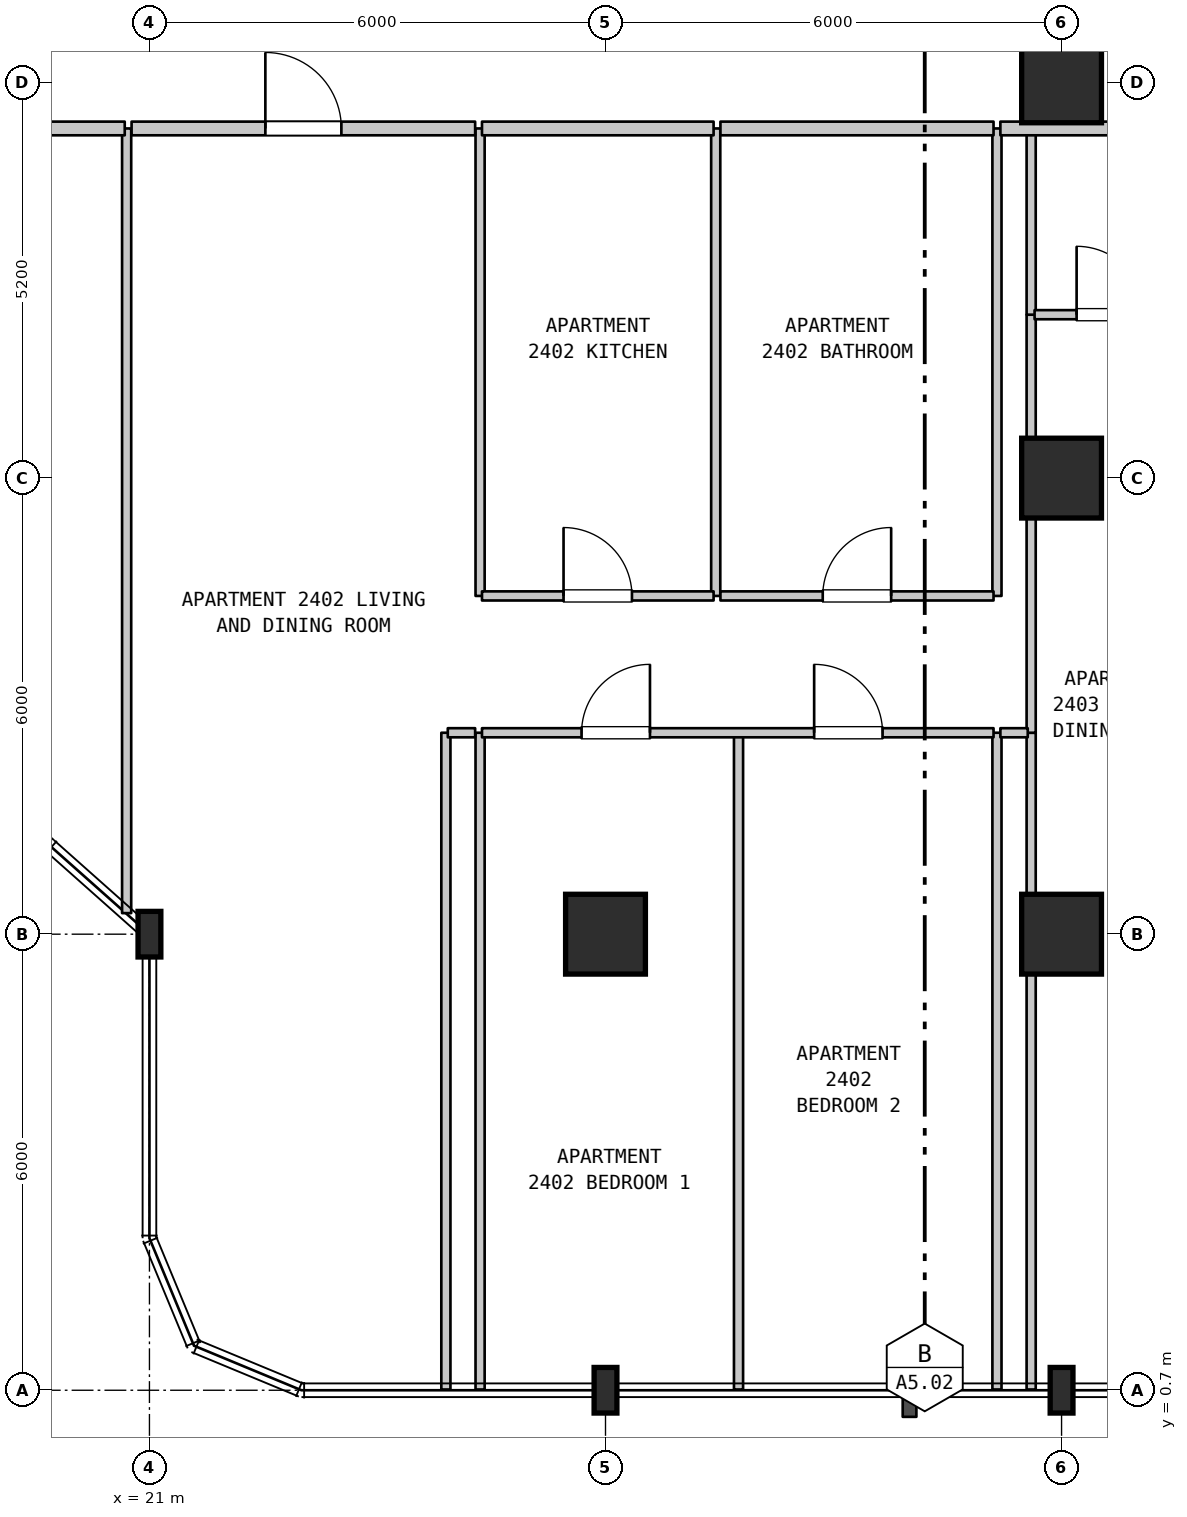
"""IFC4 building model, lengths in metres.
Left out: names, types, materials, properties, quantities, classifications, styles, units other than length and angle.
Written with IfcOpenShell. Run it as: python <this file> out.ifc"""

import sys

from ifc_helpers import new_model, si_unit, direction, frame, frame_2d, origin, origin_2d, place, context, subcontext, project, spatial, rectangle, i_section, extrude, element, fill, save


model = new_model("IFC4")
c1 = context("Model", 3, precision=1e-05, world=origin(), true_north=direction((0.0, 1.0)))
c2 = subcontext(c1, "Body", "Model", "MODEL_VIEW")
j1 = project(units=[si_unit("LENGTHUNIT", "METRE"), si_unit("PLANEANGLEUNIT", "RADIAN")], contexts=[c1])
p1 = place(None, origin())
s1 = spatial("IfcSite", under=j1, at=p1, CompositionType="ELEMENT")
p2 = place(p1, origin())
s2 = spatial("IfcBuilding", under=s1, at=p2, CompositionType="ELEMENT")
p3 = place(p2, frame((0.0, 0.0, 102.0)))
s3 = spatial("IfcBuildingStorey", under=s2, at=p3, CompositionType="ELEMENT", Elevation=102.0)
for number, where, z_axis, x_axis in (
    (1, (21.0, 6.7, 0.0), (0.0, 0.0, 1.0), (1.0, 0.0, 0.0)),
    (2, (27.0, 0.7, 0.0), (0.0, 0.0, 1.0), (1.0, 0.0, 0.0)),
):
    element("IfcColumn", number, at=place(p3, frame(where, z_axis=z_axis, x_axis=x_axis)), inside=s3, PredefinedType="COLUMN", context=c2, shape_type="SweptSolid", body=[
        extrude(i_section(OverallWidth=0.3, OverallDepth=0.6, WebThickness=0.015, FlangeThickness=0.03, FilletRadius=0.027, at=origin_2d()), origin(), (0.0, 0.0, 1.0), 3.7),
    ])
p4 = place(p3, frame((27.0, 6.7, 0.0), z_axis=(0.0, 0.0, 1.0), x_axis=(1.0, 0.0, 0.0)))
e3 = element("IfcColumn", 3, at=p4, inside=s3, PredefinedType="COLUMN", context=c2, shape_type="SweptSolid", body=[
    extrude(rectangle(XDim=1.05, YDim=1.05, at=origin_2d()), origin(), (0.0, 0.0, 1.0), 3.7),
])
p5 = place(p3, frame((33.0, 0.7, 0.0), z_axis=(0.0, 0.0, 1.0), x_axis=(1.0, 0.0, 0.0)))
e4 = element("IfcColumn", 4, at=p5, inside=s3, PredefinedType="COLUMN", context=c2, shape_type="SweptSolid", body=[
    extrude(i_section(OverallWidth=0.3, OverallDepth=0.6, WebThickness=0.015, FlangeThickness=0.03, FilletRadius=0.027, at=origin_2d()), origin(), (0.0, 0.0, 1.0), 3.7),
])
for number, where, z_axis, x_axis in (
    (5, (33.0, 6.7, 0.0), (0.0, 0.0, 1.0), (1.0, 0.0, 0.0)),
    (6, (33.0, 12.7, 0.0), (0.0, 0.0, 1.0), (1.0, 0.0, 0.0)),
    (7, (33.0, 17.9, 0.0), (0.0, 0.0, 1.0), (1.0, 0.0, 0.0)),
):
    element("IfcColumn", number, at=place(p3, frame(where, z_axis=z_axis, x_axis=x_axis)), inside=s3, PredefinedType="COLUMN", context=c2, shape_type="SweptSolid", body=[
        extrude(rectangle(XDim=1.05, YDim=1.05, at=origin_2d()), origin(), (0.0, 0.0, 1.0), 3.7),
    ])
p6 = place(p3, frame((20.7, 6.977, 0.0), z_axis=(0.0, 0.0, 1.0), x_axis=(0.0, 1.0, 0.0)))
e8 = element("IfcWall", 8, at=p6, inside=s3, PredefinedType="PARTITIONING", context=c2, shape_type="SweptSolid", body=[
    extrude(rectangle(XDim=10.323, YDim=0.12, at=frame_2d((5.162, 0.0))), origin(), (0.0, 0.0, 1.0), 3.385),
])
for number, where, z_axis, x_axis in (
    (9, (24.9, 0.71, 0.0), (0.0, 0.0, 1.0), (0.0, 1.0, 0.0)),
    (10, (25.35, 0.71, 0.0), (0.0, 0.0, 1.0), (0.0, 1.0, 0.0)),
):
    element("IfcWall", number, at=place(p3, frame(where, z_axis=z_axis, x_axis=x_axis)), inside=s3, PredefinedType="PARTITIONING", context=c2, shape_type="SweptSolid", body=[
        extrude(rectangle(XDim=8.64, YDim=0.12, at=frame_2d((4.32, 0.0))), origin(), (0.0, 0.0, 1.0), 3.385),
    ])
for number, where, z_axis, x_axis in (
    (11, (25.35, 11.15, 0.0), (0.0, 0.0, 1.0), (0.0, 1.0, 0.0)),
    (12, (28.45, 11.15, 0.0), (0.0, 0.0, 1.0), (0.0, 1.0, 0.0)),
):
    element("IfcWall", number, at=place(p3, frame(where, z_axis=z_axis, x_axis=x_axis)), inside=s3, PredefinedType="PARTITIONING", context=c2, shape_type="SweptSolid", body=[
        extrude(rectangle(XDim=6.15, YDim=0.12, at=frame_2d((3.075, 0.0))), origin(), (0.0, 0.0, 1.0), 3.385),
    ])
for number, where, z_axis, x_axis in (
    (13, (28.75, 0.71, 0.0), (0.0, 0.0, 1.0), (0.0, 1.0, 0.0)),
    (14, (32.15, 0.71, 0.0), (0.0, 0.0, 1.0), (0.0, 1.0, 0.0)),
):
    element("IfcWall", number, at=place(p3, frame(where, z_axis=z_axis, x_axis=x_axis)), inside=s3, PredefinedType="PARTITIONING", context=c2, shape_type="SweptSolid", body=[
        extrude(rectangle(XDim=8.64, YDim=0.12, at=frame_2d((4.32, 0.0))), origin(), (0.0, 0.0, 1.0), 3.385),
    ])
p7 = place(p3, frame((32.15, 11.15, 0.0), z_axis=(0.0, 0.0, 1.0), x_axis=(0.0, 1.0, 0.0)))
e15 = element("IfcWall", 15, at=p7, inside=s3, PredefinedType="PARTITIONING", context=c2, shape_type="SweptSolid", body=[
    extrude(rectangle(XDim=6.15, YDim=0.12, at=frame_2d((3.075, 0.0))), origin(), (0.0, 0.0, 1.0), 3.385),
])
p8 = place(p3, frame((32.6, 0.71, 0.0), z_axis=(0.0, 0.0, 1.0), x_axis=(0.0, 1.0, 0.0)))
e16 = element("IfcWall", 16, at=p8, inside=s3, PredefinedType="PARTITIONING", context=c2, shape_type="SweptSolid", body=[
    extrude(rectangle(XDim=8.64, YDim=0.12, at=frame_2d((4.32, 0.0))), origin(), (0.0, 0.0, 1.0), 3.385),
])
p9 = place(p3, frame((32.6, 9.35, 0.0), z_axis=(0.0, 0.0, 1.0), x_axis=(0.0, 1.0, 0.0)))
e17 = element("IfcWall", 17, at=p9, inside=s3, PredefinedType="PARTITIONING", context=c2, shape_type="SweptSolid", body=[
    extrude(rectangle(XDim=5.5, YDim=0.12, at=frame_2d((2.75, 0.0))), origin(), (0.0, 0.0, 1.0), 3.385),
])
p10 = place(p3, frame((32.6, 14.85, 0.0), z_axis=(0.0, 0.0, 1.0), x_axis=(0.0, 1.0, 0.0)))
e18 = element("IfcWall", 18, at=p10, inside=s3, PredefinedType="PARTITIONING", context=c2, shape_type="SweptSolid", body=[
    extrude(rectangle(XDim=2.45, YDim=0.12, at=frame_2d((1.225, 0.0))), origin(), (0.0, 0.0, 1.0), 3.385),
])
p11 = place(p3, frame((24.925, 9.35, 0.0), z_axis=(0.0, 0.0, 1.0), x_axis=(1.0, 0.0, 0.0)))
e19 = element("IfcWall", 19, at=p11, inside=s3, PredefinedType="PARTITIONING", context=c2, shape_type="SweptSolid", body=[
    extrude(rectangle(XDim=0.36, YDim=0.12, at=frame_2d((0.18, 0.0))), origin(), (0.0, 0.0, 1.0), 3.385),
])
p12 = place(p3, frame((25.375, 9.35, 0.0), z_axis=(0.0, 0.0, 1.0), x_axis=(1.0, 0.0, 0.0)))
e20 = element("IfcWall", 20, at=p12, inside=s3, PredefinedType="PARTITIONING", context=c2, shape_type="SweptSolid", body=[
    extrude(rectangle(XDim=6.73, YDim=0.12, at=frame_2d((3.365, 0.0))), origin(), (0.0, 0.0, 1.0), 3.385),
])
p13 = place(p12, frame((1.31, 0.0, 0.0)))
e21 = element("IfcOpeningElement", 21, at=p13, cuts=e20, PredefinedType="OPENING", context=c2, shape_type="SweptSolid", body=[
    extrude(rectangle(XDim=0.9, YDim=2.15, at=frame_2d((0.45, 1.075))), frame((0.0, 0.07, 0.0), z_axis=(0.0, -1.0, 0.0), x_axis=(1.0, 0.0, 0.0)), (0.0, 0.0, 1.0), 0.14),
])
p14 = place(p12, frame((4.37, 0.0, 0.0)))
e22 = element("IfcOpeningElement", 22, at=p14, cuts=e20, PredefinedType="OPENING", context=c2, shape_type="SweptSolid", body=[
    extrude(rectangle(XDim=0.9, YDim=2.15, at=frame_2d((0.45, 1.075))), frame((0.0, 0.07, 0.0), z_axis=(0.0, -1.0, 0.0), x_axis=(1.0, 0.0, 0.0)), (0.0, 0.0, 1.0), 0.14),
])
p15 = place(p3, frame((32.195, 9.35, 0.0), z_axis=(0.0, 0.0, 1.0), x_axis=(1.0, 0.0, 0.0)))
e23 = element("IfcWall", 23, at=p15, inside=s3, PredefinedType="PARTITIONING", context=c2, shape_type="SweptSolid", body=[
    extrude(rectangle(XDim=0.36, YDim=0.12, at=frame_2d((0.18, 0.0))), origin(), (0.0, 0.0, 1.0), 3.385),
])
p16 = place(p3, frame((25.375, 11.15, 0.0), z_axis=(0.0, 0.0, 1.0), x_axis=(1.0, 0.0, 0.0)))
e24 = element("IfcWall", 24, at=p16, inside=s3, PredefinedType="PARTITIONING", context=c2, shape_type="SweptSolid", body=[
    extrude(rectangle(XDim=3.047, YDim=0.12, at=frame_2d((1.523, 0.0))), origin(), (0.0, 0.0, 1.0), 3.385),
])
p17 = place(p16, frame((1.073, 0.0, 0.0)))
e25 = element("IfcOpeningElement", 25, at=p17, cuts=e24, PredefinedType="OPENING", context=c2, shape_type="SweptSolid", body=[
    extrude(rectangle(XDim=0.9, YDim=2.15, at=frame_2d((0.45, 1.075))), frame((0.0, 0.07, 0.0), z_axis=(0.0, -1.0, 0.0), x_axis=(1.0, 0.0, 0.0)), (0.0, 0.0, 1.0), 0.14),
])
p18 = place(p3, frame((28.512, 11.15, 0.0), z_axis=(0.0, 0.0, 1.0), x_axis=(1.0, 0.0, 0.0)))
e26 = element("IfcWall", 26, at=p18, inside=s3, PredefinedType="PARTITIONING", context=c2, shape_type="SweptSolid", body=[
    extrude(rectangle(XDim=3.593, YDim=0.12, at=frame_2d((1.796, 0.0))), origin(), (0.0, 0.0, 1.0), 3.385),
])
p19 = place(p18, frame((1.346, 0.0, 0.0)))
e27 = element("IfcOpeningElement", 27, at=p19, cuts=e26, PredefinedType="OPENING", context=c2, shape_type="SweptSolid", body=[
    extrude(rectangle(XDim=0.9, YDim=2.1, at=frame_2d((0.45, 1.05))), frame((0.0, 0.07, 0.0), z_axis=(0.0, -1.0, 0.0), x_axis=(1.0, 0.0, 0.0)), (0.0, 0.0, 1.0), 0.14),
])
p20 = place(p3, frame((32.645, 14.85, 0.0), z_axis=(0.0, 0.0, 1.0), x_axis=(1.0, 0.0, 0.0)))
e28 = element("IfcWall", 28, at=p20, inside=s3, PredefinedType="PARTITIONING", context=c2, shape_type="SweptSolid", body=[
    extrude(rectangle(XDim=2.16, YDim=0.12, at=frame_2d((1.08, 0.0))), origin(), (0.0, 0.0, 1.0), 3.385),
])
p21 = place(p20, frame((0.553, 0.0, 0.0)))
e29 = element("IfcOpeningElement", 29, at=p21, cuts=e28, PredefinedType="OPENING", context=c2, shape_type="SweptSolid", body=[
    extrude(rectangle(XDim=0.9, YDim=2.15, at=frame_2d((0.45, 1.075))), frame((0.0, 0.07, 0.0), z_axis=(0.0, -1.0, 0.0), x_axis=(1.0, 0.0, 0.0)), (0.0, 0.0, 1.0), 0.14),
])
p22 = place(p3, frame((18.815, 17.3, 0.0), z_axis=(0.0, 0.0, 1.0), x_axis=(1.0, 0.0, 0.0)))
e30 = element("IfcWall", 30, at=p22, inside=s3, PredefinedType="STANDARD", context=c2, shape_type="SweptSolid", body=[
    extrude(rectangle(XDim=1.86, YDim=0.18, at=frame_2d((0.93, 0.0))), origin(), (0.0, 0.0, 1.0), 3.385),
])
p23 = place(p3, frame((20.765, 17.3, 0.0), z_axis=(0.0, 0.0, 1.0), x_axis=(1.0, 0.0, 0.0)))
e31 = element("IfcWall", 31, at=p23, inside=s3, PredefinedType="STANDARD", context=c2, shape_type="SweptSolid", body=[
    extrude(rectangle(XDim=4.52, YDim=0.18, at=frame_2d((2.26, 0.0))), origin(), (0.0, 0.0, 1.0), 3.385),
])
p24 = place(p23, frame((1.76, 0.0, 0.0)))
e32 = element("IfcOpeningElement", 32, at=p24, cuts=e31, PredefinedType="OPENING", context=c2, shape_type="SweptSolid", body=[
    extrude(rectangle(XDim=1.0, YDim=2.15, at=frame_2d((0.5, 1.075))), frame((0.0, 0.1, 0.0), z_axis=(0.0, -1.0, 0.0), x_axis=(1.0, 0.0, 0.0)), (0.0, 0.0, 1.0), 0.2),
])
p25 = place(p3, frame((25.375, 17.3, 0.0), z_axis=(0.0, 0.0, 1.0), x_axis=(1.0, 0.0, 0.0)))
e33 = element("IfcWall", 33, at=p25, inside=s3, PredefinedType="STANDARD", context=c2, shape_type="SweptSolid", body=[
    extrude(rectangle(XDim=3.047, YDim=0.18, at=frame_2d((1.523, 0.0))), origin(), (0.0, 0.0, 1.0), 3.385),
])
p26 = place(p3, frame((28.512, 17.3, 0.0), z_axis=(0.0, 0.0, 1.0), x_axis=(1.0, 0.0, 0.0)))
e34 = element("IfcWall", 34, at=p26, inside=s3, PredefinedType="STANDARD", context=c2, shape_type="SweptSolid", body=[
    extrude(rectangle(XDim=3.593, YDim=0.18, at=frame_2d((1.796, 0.0))), origin(), (0.0, 0.0, 1.0), 3.385),
])
p27 = place(p3, frame((32.195, 17.3, 0.0), z_axis=(0.0, 0.0, 1.0), x_axis=(1.0, 0.0, 0.0)))
e35 = element("IfcWall", 35, at=p27, inside=s3, PredefinedType="STANDARD", context=c2, shape_type="SweptSolid", body=[
    extrude(rectangle(XDim=5.14, YDim=0.18, at=frame_2d((2.57, 0.0))), origin(), (0.0, 0.0, 1.0), 3.385),
])
p28 = place(p27, frame((2.198, 0.0, 0.0)))
e36 = element("IfcOpeningElement", 36, at=p28, cuts=e35, PredefinedType="OPENING", context=c2, shape_type="SweptSolid", body=[
    extrude(rectangle(XDim=1.0, YDim=2.15, at=frame_2d((0.5, 1.075))), frame((0.0, 0.1, 0.0), z_axis=(0.0, -1.0, 0.0), x_axis=(1.0, 0.0, 0.0)), (0.0, 0.0, 1.0), 0.2),
])
p29 = place(p13, origin())
e37 = element("IfcDoor", 37, at=p29, inside=s3, OperationType="SINGLE_SWING_RIGHT", PredefinedType="DOOR", context=c2, shape_type="SweptSolid", body=[
    extrude(rectangle(XDim=0.9, YDim=2.15, at=frame_2d((0.45, 1.075))), frame((0.0, 0.025, 0.0), z_axis=(0.0, -1.0, 0.0), x_axis=(1.0, 0.0, 0.0)), (0.0, 0.0, 1.0), 0.05),
])
fill(e21, e37)
p30 = place(p14, origin())
e38 = element("IfcDoor", 38, at=p30, inside=s3, OperationType="SINGLE_SWING_LEFT", PredefinedType="DOOR", context=c2, shape_type="SweptSolid", body=[
    extrude(rectangle(XDim=0.9, YDim=2.15, at=frame_2d((0.45, 1.075))), frame((0.0, 0.025, 0.0), z_axis=(0.0, -1.0, 0.0), x_axis=(1.0, 0.0, 0.0)), (0.0, 0.0, 1.0), 0.05),
])
fill(e22, e38)
p31 = place(p17, origin())
e39 = element("IfcDoor", 39, at=p31, inside=s3, OperationType="SINGLE_SWING_LEFT", PredefinedType="DOOR", context=c2, shape_type="SweptSolid", body=[
    extrude(rectangle(XDim=0.9, YDim=2.15, at=frame_2d((0.45, 1.075))), frame((0.0, 0.025, 0.0), z_axis=(0.0, -1.0, 0.0), x_axis=(1.0, 0.0, 0.0)), (0.0, 0.0, 1.0), 0.05),
])
fill(e25, e39)
p32 = place(p19, origin())
e40 = element("IfcDoor", 40, at=p32, inside=s3, OperationType="SINGLE_SWING_RIGHT", PredefinedType="DOOR", context=c2, shape_type="SweptSolid", body=[
    extrude(rectangle(XDim=0.9, YDim=2.1, at=frame_2d((0.45, 1.05))), frame((0.0, 0.025, 0.0), z_axis=(0.0, -1.0, 0.0), x_axis=(1.0, 0.0, 0.0)), (0.0, 0.0, 1.0), 0.05),
])
fill(e27, e40)
p33 = place(p21, origin())
e41 = element("IfcDoor", 41, at=p33, inside=s3, OperationType="SINGLE_SWING_LEFT", PredefinedType="DOOR", context=c2, shape_type="SweptSolid", body=[
    extrude(rectangle(XDim=0.9, YDim=2.15, at=frame_2d((0.45, 1.075))), frame((0.0, 0.025, 0.0), z_axis=(0.0, -1.0, 0.0), x_axis=(1.0, 0.0, 0.0)), (0.0, 0.0, 1.0), 0.05),
])
fill(e29, e41)
p34 = place(p24, origin())
e42 = element("IfcDoor", 42, at=p34, inside=s3, OperationType="SINGLE_SWING_LEFT", PredefinedType="DOOR", context=c2, shape_type="SweptSolid", body=[
    extrude(rectangle(XDim=1.0, YDim=2.15, at=frame_2d((0.5, 1.075))), frame((0.0, 0.025, 0.0), z_axis=(0.0, -1.0, 0.0), x_axis=(1.0, 0.0, 0.0)), (0.0, 0.0, 1.0), 0.05),
])
fill(e32, e42)
save(model, sys.argv[1])
